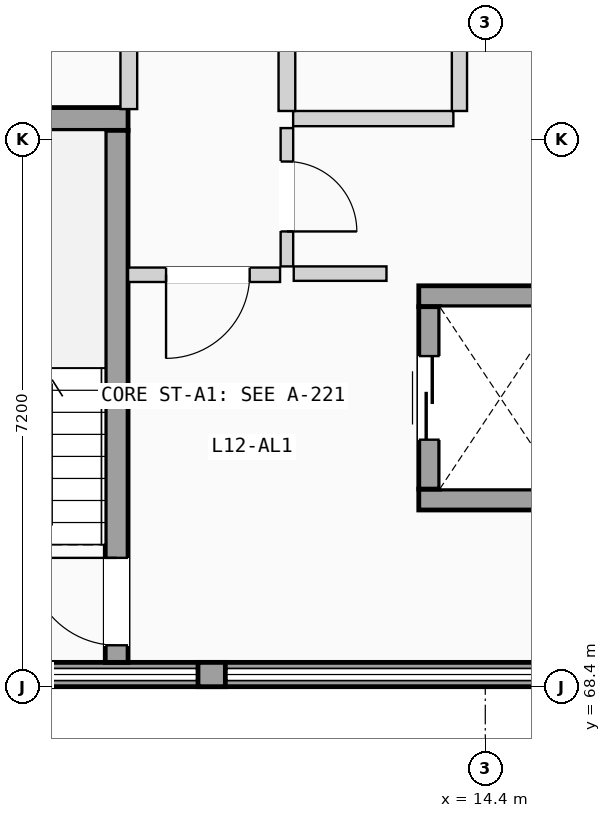
"""IFC4 building model, lengths in metres.
Left out: names, types, materials, properties, quantities, classifications, styles, units other than length and angle.
Written with IfcOpenShell. Run it as: python <this file> out.ifc"""

import sys

from ifc_helpers import new_model, si_unit, direction, frame, frame_2d, origin, place, context, subcontext, project, spatial, rectangle, extrude, element, fill, save


model = new_model("IFC4")
c1 = context("Model", 3, precision=1e-05, world=origin(), true_north=direction((0.0, 1.0)))
c2 = subcontext(c1, "Body", "Model", "MODEL_VIEW")
j1 = project(units=[si_unit("LENGTHUNIT", "METRE"), si_unit("PLANEANGLEUNIT", "RADIAN")], contexts=[c1])
p1 = place(None, origin())
s1 = spatial("IfcSite", under=j1, at=p1, CompositionType="ELEMENT")
p2 = place(p1, origin())
s2 = spatial("IfcBuilding", under=s1, at=p2, CompositionType="ELEMENT")
p3 = place(p2, frame((0.0, 0.0, 40.425)))
s3 = spatial("IfcBuildingStorey", under=s2, at=p3, CompositionType="ELEMENT", Elevation=40.425)
p4 = place(p3, frame((1.8, 68.56, 0.0), z_axis=(0.0, 0.0, 1.0), x_axis=(1.0, 0.0, 0.0)))
e1 = element("IfcWall", 1, at=p4, inside=s3, PredefinedType="SOLIDWALL", context=c2, shape_type="SweptSolid", body=[
    extrude(rectangle(XDim=18.0, YDim=0.32, at=frame_2d((9.0, 0.0))), origin(), (0.0, 0.0, 1.0), 1.11),
])
p5 = place(p3, frame((10.62, 68.56, 1.11), z_axis=(0.0, 0.0, 1.0), x_axis=(1.0, 0.0, 0.0)))
e2 = element("IfcWall", 2, at=p5, inside=s3, PredefinedType="SOLIDWALL", context=c2, shape_type="SweptSolid", body=[
    extrude(rectangle(XDim=0.36, YDim=0.32, at=frame_2d((0.18, 0.0))), origin(), (0.0, 0.0, 1.0), 1.78),
])
p6 = place(p3, frame((5.65, 75.87, 0.0), z_axis=(0.0, 0.0, 1.0), x_axis=(1.0, 0.0, 0.0)))
e3 = element("IfcWall", 3, at=p6, inside=s3, PredefinedType="SHEAR", context=c2, shape_type="SweptSolid", body=[
    extrude(rectangle(XDim=4.05, YDim=0.3, at=frame_2d((2.025, 0.0))), origin(), (0.0, 0.0, 1.0), 2.89),
])
p7 = place(p3, frame((9.55, 68.72, 0.0), z_axis=(0.0, 0.0, 1.0), x_axis=(0.0, 1.0, 0.0)))
e4 = element("IfcWall", 4, at=p7, inside=s3, PredefinedType="SHEAR", context=c2, shape_type="SweptSolid", body=[
    extrude(rectangle(XDim=7.0, YDim=0.3, at=frame_2d((3.5, 0.0))), origin(), (0.0, 0.0, 1.0), 2.89),
])
p8 = place(p7, frame((0.225, 0.0, 0.0)))
e5 = element("IfcOpeningElement", 5, at=p8, cuts=e4, PredefinedType="OPENING", context=c2, shape_type="SweptSolid", body=[
    extrude(rectangle(XDim=1.15, YDim=2.12, at=frame_2d((0.575, 1.06))), frame((0.0, 0.16, 0.0), z_axis=(0.0, -1.0, 0.0), x_axis=(1.0, 0.0, 0.0)), (0.0, 0.0, 1.0), 0.32),
])
for number, where, z_axis, x_axis in (
    (6, (13.525, 70.863, 0.0), (0.0, 0.0, 1.0), (1.0, 0.0, 0.0)),
    (7, (13.525, 73.538, 0.0), (0.0, 0.0, 1.0), (1.0, 0.0, 0.0)),
):
    element("IfcWall", number, at=place(p3, frame(where, z_axis=z_axis, x_axis=x_axis)), inside=s3, PredefinedType="SHEAR", context=c2, shape_type="SweptSolid", body=[
        extrude(rectangle(XDim=2.15, YDim=0.275, at=frame_2d((1.075, 0.0))), origin(), (0.0, 0.0, 1.0), 2.89),
    ])
p9 = place(p3, frame((13.663, 71.0, 0.0), z_axis=(0.0, 0.0, 1.0), x_axis=(0.0, 1.0, 0.0)))
e8 = element("IfcWall", 8, at=p9, inside=s3, PredefinedType="SHEAR", context=c2, shape_type="SweptSolid", body=[
    extrude(rectangle(XDim=2.4, YDim=0.275, at=frame_2d((1.2, 0.0))), origin(), (0.0, 0.0, 1.0), 2.89),
])
p10 = place(p9, frame((0.65, 0.0, 0.0)))
e9 = element("IfcOpeningElement", 9, at=p10, cuts=e8, PredefinedType="OPENING", context=c2, shape_type="SweptSolid", body=[
    extrude(rectangle(XDim=1.1, YDim=2.15, at=frame_2d((0.55, 1.075))), frame((0.0, 0.147, 0.0), z_axis=(0.0, -1.0, 0.0), x_axis=(1.0, 0.0, 0.0)), (0.0, 0.0, 1.0), 0.295),
])
p11 = place(p3, frame((11.88, 73.835, 0.0), z_axis=(0.0, 0.0, 1.0), x_axis=(1.0, 0.0, 0.0)))
e10 = element("IfcWall", 10, at=p11, inside=s3, PredefinedType="PARTITIONING", context=c2, shape_type="SweptSolid", body=[
    extrude(rectangle(XDim=1.22, YDim=0.19, at=frame_2d((0.61, 0.0))), origin(), (0.0, 0.0, 1.0), 2.87),
])
p12 = place(p3, frame((9.7, 73.82, 0.0), z_axis=(0.0, 0.0, 1.0), x_axis=(1.0, 0.0, 0.0)))
e11 = element("IfcWall", 11, at=p12, inside=s3, PredefinedType="PARTITIONING", context=c2, shape_type="SweptSolid", body=[
    extrude(rectangle(XDim=2.0, YDim=0.19, at=frame_2d((1.0, 0.0))), origin(), (0.0, 0.0, 1.0), 2.87),
])
p13 = place(p12, frame((0.5, 0.0, 0.0)))
e12 = element("IfcOpeningElement", 12, at=p13, cuts=e11, PredefinedType="OPENING", context=c2, shape_type="SweptSolid", body=[
    extrude(rectangle(XDim=1.1, YDim=2.12, at=frame_2d((0.55, 1.06))), frame((0.0, 0.105, 0.0), z_axis=(0.0, -1.0, 0.0), x_axis=(1.0, 0.0, 0.0)), (0.0, 0.0, 1.0), 0.21),
])
p14 = place(p3, frame((11.79, 73.93, 0.0), z_axis=(0.0, 0.0, 1.0), x_axis=(0.0, 1.0, 0.0)))
e13 = element("IfcWall", 13, at=p14, inside=s3, PredefinedType="PARTITIONING", context=c2, shape_type="SweptSolid", body=[
    extrude(rectangle(XDim=1.82, YDim=0.165, at=frame_2d((0.91, 0.0))), origin(), (0.0, 0.0, 1.0), 2.87),
])
p15 = place(p14, frame((0.46, 0.0, 0.0)))
e14 = element("IfcOpeningElement", 14, at=p15, cuts=e13, PredefinedType="OPENING", context=c2, shape_type="SweptSolid", body=[
    extrude(rectangle(XDim=0.92, YDim=2.04, at=frame_2d((0.46, 1.02))), frame((0.0, 0.093, 0.0), z_axis=(0.0, -1.0, 0.0), x_axis=(1.0, 0.0, 0.0)), (0.0, 0.0, 1.0), 0.185),
])
p16 = place(p3, frame((11.872, 75.875, 0.0), z_axis=(0.0, 0.0, 1.0), x_axis=(1.0, 0.0, 0.0)))
e15 = element("IfcWall", 15, at=p16, inside=s3, PredefinedType="PLUMBINGWALL", context=c2, shape_type="SweptSolid", body=[
    extrude(rectangle(XDim=2.108, YDim=0.2, at=frame_2d((1.054, 0.0))), origin(), (0.0, 0.0, 1.0), 2.87),
])
p17 = place(p3, frame((9.71, 76.0, 0.0), z_axis=(0.0, 0.0, 1.0), x_axis=(0.0, 1.0, 0.0)))
e16 = element("IfcWall", 16, at=p17, inside=s3, PredefinedType="PLUMBINGWALL", context=c2, shape_type="SweptSolid", body=[
    extrude(rectangle(XDim=4.039, YDim=0.22, at=frame_2d((2.02, 0.0))), origin(), (0.0, 0.0, 1.0), 2.87),
])
p18 = place(p3, frame((11.79, 75.975, 0.0), z_axis=(0.0, 0.0, 1.0), x_axis=(0.0, 1.0, 0.0)))
e17 = element("IfcWall", 17, at=p18, inside=s3, PredefinedType="PLUMBINGWALL", context=c2, shape_type="SweptSolid", body=[
    extrude(rectangle(XDim=4.064, YDim=0.22, at=frame_2d((2.032, 0.0))), origin(), (0.0, 0.0, 1.0), 2.87),
])
p19 = place(p3, frame((14.06, 75.975, 0.0), z_axis=(0.0, 0.0, 1.0), x_axis=(0.0, 1.0, 0.0)))
e18 = element("IfcWall", 18, at=p19, inside=s3, PredefinedType="PLUMBINGWALL", context=c2, shape_type="SweptSolid", body=[
    extrude(rectangle(XDim=4.064, YDim=0.2, at=frame_2d((2.032, 0.0))), origin(), (0.0, 0.0, 1.0), 2.87),
])
p20 = place(p8, origin())
e19 = element("IfcDoor", 19, at=p20, inside=s3, OperationType="SINGLE_SWING_RIGHT", PredefinedType="DOOR", context=c2, shape_type="SweptSolid", body=[
    extrude(rectangle(XDim=1.15, YDim=2.12, at=frame_2d((0.575, 1.06))), frame((0.0, 0.025, 0.0), z_axis=(0.0, -1.0, 0.0), x_axis=(1.0, 0.0, 0.0)), (0.0, 0.0, 1.0), 0.05),
])
fill(e5, e19)
p21 = place(p10, origin())
e20 = element("IfcDoor", 20, at=p21, inside=s3, OperationType="SLIDING_TO_LEFT", PredefinedType="DOOR", context=c2, shape_type="SweptSolid", body=[
    extrude(rectangle(XDim=1.1, YDim=2.15, at=frame_2d((0.55, 1.075))), frame((0.0, 0.025, 0.0), z_axis=(0.0, -1.0, 0.0), x_axis=(1.0, 0.0, 0.0)), (0.0, 0.0, 1.0), 0.05),
])
fill(e9, e20)
p22 = place(p13, frame((1.1, 0.0, 0.0), z_axis=(0.0, 0.0, 1.0), x_axis=(-1.0, 0.0, 0.0)))
e21 = element("IfcDoor", 21, at=p22, inside=s3, OperationType="SINGLE_SWING_LEFT", PredefinedType="DOOR", context=c2, shape_type="SweptSolid", body=[
    extrude(rectangle(XDim=1.1, YDim=2.12, at=frame_2d((0.55, 1.06))), frame((0.0, 0.025, 0.0), z_axis=(0.0, -1.0, 0.0), x_axis=(1.0, 0.0, 0.0)), (0.0, 0.0, 1.0), 0.05),
])
fill(e12, e21)
p23 = place(p15, frame((0.92, 0.0, 0.0), z_axis=(0.0, 0.0, 1.0), x_axis=(-1.0, 0.0, 0.0)))
e22 = element("IfcDoor", 22, at=p23, inside=s3, OperationType="SINGLE_SWING_LEFT", PredefinedType="DOOR", context=c2, shape_type="SweptSolid", body=[
    extrude(rectangle(XDim=0.92, YDim=2.04, at=frame_2d((0.46, 1.02))), frame((0.0, 0.025, 0.0), z_axis=(0.0, -1.0, 0.0), x_axis=(1.0, 0.0, 0.0)), (0.0, 0.0, 1.0), 0.05),
])
fill(e14, e22)
save(model, sys.argv[1])
